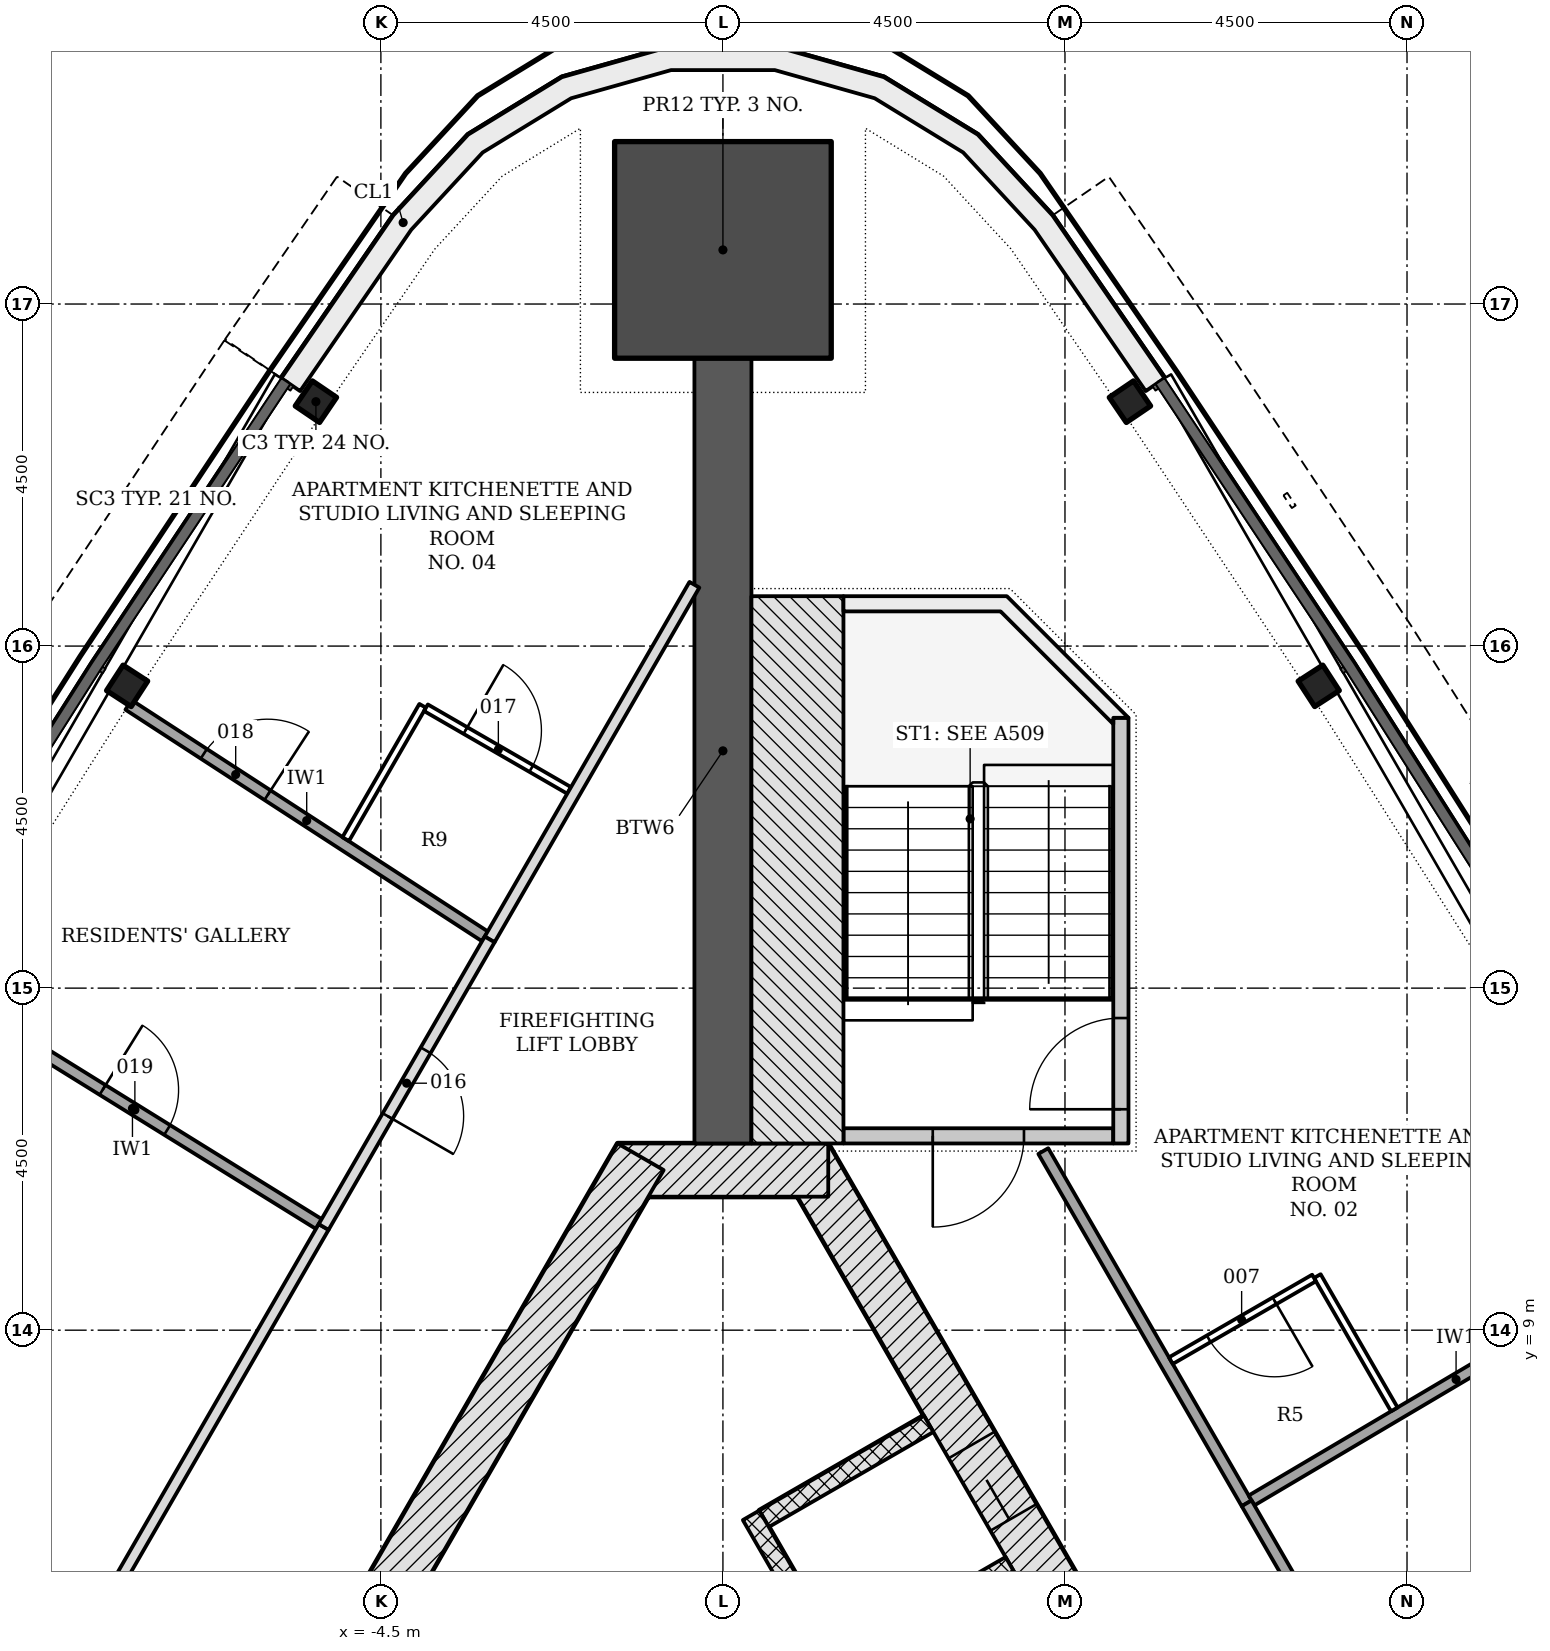
"""IFC4 building model, lengths in metres.
Left out: names, types, materials, properties, quantities, classifications, styles, units other than length and angle.
Written with IfcOpenShell. Run it as: python <this file> out.ifc"""

import sys

from ifc_helpers import new_model, si_unit, direction, frame, frame_2d, origin, origin_2d, place, context, subcontext, project, spatial, polyline, rectangle, i_section, outline, extrude, element, fill, save


model = new_model("IFC4")
c1 = context("Model", 3, precision=1e-05, world=origin(), true_north=direction((0.0, 1.0)))
c2 = subcontext(c1, "Body", "Model", "MODEL_VIEW")
j1 = project(units=[si_unit("LENGTHUNIT", "METRE"), si_unit("PLANEANGLEUNIT", "RADIAN")], contexts=[c1])
p1 = place(None, origin())
s1 = spatial("IfcSite", under=j1, at=p1, CompositionType="ELEMENT")
p2 = place(p1, origin())
s2 = spatial("IfcBuilding", under=s1, at=p2, CompositionType="ELEMENT")
p3 = place(p2, frame((0.0, 0.0, 158.1)))
s3 = spatial("IfcBuildingStorey", under=s2, at=p3, CompositionType="ELEMENT", Elevation=158.1)
p4 = place(p3, frame((10.311, -4.703, -0.2), z_axis=(0.0, 0.0, 1.0), x_axis=(-0.500001446645, 0.866024568562, 0.0)))
e1 = element("IfcWall", 1, at=p4, inside=s3, PredefinedType="SHEAR", context=c2, shape_type="SweptSolid", body=[
    extrude(rectangle(XDim=18.458, YDim=0.7, at=frame_2d((9.229, 0.0))), origin(), (0.0, 0.0, 1.0), 3.6),
])
p5 = place(p4, frame((4.379, 0.0, 0.2)))
e2 = element("IfcOpeningElement", 2, at=p5, cuts=e1, PredefinedType="OPENING", context=c2, shape_type="SweptSolid", body=[
    extrude(rectangle(XDim=1.1, YDim=2.1, at=frame_2d((0.55, 1.05))), frame((0.0, 0.36, 0.0), z_axis=(0.0, -1.0, 0.0), x_axis=(1.0, 0.0, 0.0)), (0.0, 0.0, 1.0), 0.72),
])
p6 = place(p4, frame((6.529, 0.0, 0.2)))
e3 = element("IfcOpeningElement", 3, at=p6, cuts=e1, PredefinedType="OPENING", context=c2, shape_type="SweptSolid", body=[
    extrude(rectangle(XDim=1.1, YDim=2.1, at=frame_2d((0.55, 1.05))), frame((0.0, 0.36, 0.0), z_axis=(0.0, -1.0, 0.0), x_axis=(1.0, 0.0, 0.0)), (0.0, 0.0, 1.0), 0.72),
])
p7 = place(p4, frame((8.679, 0.0, 0.2)))
e4 = element("IfcOpeningElement", 4, at=p7, cuts=e1, PredefinedType="OPENING", context=c2, shape_type="SweptSolid", body=[
    extrude(rectangle(XDim=1.1, YDim=2.1, at=frame_2d((0.55, 1.05))), frame((0.0, 0.36, 0.0), z_axis=(0.0, -1.0, 0.0), x_axis=(1.0, 0.0, 0.0)), (0.0, 0.0, 1.0), 0.72),
])
p8 = place(p4, frame((10.829, 0.0, 0.2)))
e5 = element("IfcOpeningElement", 5, at=p8, cuts=e1, PredefinedType="OPENING", context=c2, shape_type="SweptSolid", body=[
    extrude(rectangle(XDim=1.1, YDim=2.1, at=frame_2d((0.55, 1.05))), frame((0.0, 0.36, 0.0), z_axis=(0.0, -1.0, 0.0), x_axis=(1.0, 0.0, 0.0)), (0.0, 0.0, 1.0), 0.72),
])
p9 = place(p4, frame((12.979, 0.0, 0.2)))
e6 = element("IfcOpeningElement", 6, at=p9, cuts=e1, PredefinedType="OPENING", context=c2, shape_type="SweptSolid", body=[
    extrude(rectangle(XDim=1.1, YDim=2.1, at=frame_2d((0.55, 1.05))), frame((0.0, 0.36, 0.0), z_axis=(0.0, -1.0, 0.0), x_axis=(1.0, 0.0, 0.0)), (0.0, 0.0, 1.0), 0.72),
])
p10 = place(p3, frame((1.386, 11.106, -0.2), z_axis=(0.0, 0.0, 1.0), x_axis=(-1.0, 0.0, 0.0)))
e7 = element("IfcWall", 7, at=p10, inside=s3, PredefinedType="SHEAR", context=c2, shape_type="SweptSolid", body=[
    extrude(rectangle(XDim=2.771, YDim=0.7, at=frame_2d((1.386, 0.0))), origin(), (0.0, 0.0, 1.0), 3.6),
])
p11 = place(p3, frame((-1.083, 11.281, -0.2), z_axis=(0.0, 0.0, 1.0), x_axis=(-0.500001446645, -0.866024568562, 0.0)))
e8 = element("IfcWall", 8, at=p11, inside=s3, PredefinedType="SHEAR", context=c2, shape_type="SweptSolid", body=[
    extrude(rectangle(XDim=18.458, YDim=0.7, at=frame_2d((9.229, 0.0))), origin(), (0.0, 0.0, 1.0), 3.6),
])
p12 = place(p11, frame((8.979, 0.0, 0.2)))
e9 = element("IfcOpeningElement", 9, at=p12, cuts=e8, PredefinedType="OPENING", context=c2, shape_type="SweptSolid", body=[
    extrude(rectangle(XDim=1.2, YDim=2.1, at=frame_2d((0.6, 1.05))), frame((0.0, 0.36, 0.0), z_axis=(0.0, -1.0, 0.0), x_axis=(1.0, 0.0, 0.0)), (0.0, 0.0, 1.0), 0.72),
])
p13 = place(p11, frame((11.029, 0.0, 0.2)))
e10 = element("IfcOpeningElement", 10, at=p13, cuts=e8, PredefinedType="OPENING", context=c2, shape_type="SweptSolid", body=[
    extrude(rectangle(XDim=1.2, YDim=2.1, at=frame_2d((0.6, 1.05))), frame((0.0, 0.36, 0.0), z_axis=(0.0, -1.0, 0.0), x_axis=(1.0, 0.0, 0.0)), (0.0, 0.0, 1.0), 0.72),
])
p14 = place(p3, frame((0.0, 11.456, -0.2), z_axis=(0.0, 0.0, 1.0), x_axis=(0.0, 1.0, 0.0)))
e11 = element("IfcWall", 11, at=p14, inside=s3, PredefinedType="SHEAR", context=c2, shape_type="SweptSolid", body=[
    extrude(rectangle(XDim=10.331, YDim=0.75, at=frame_2d((5.166, 0.0))), origin(), (0.0, 0.0, 1.0), 3.6),
])
p15 = place(p3, frame((0.0, 23.212, -0.2), z_axis=(0.0, 0.0, 1.0), x_axis=(0.0, 1.0, 0.0)))
e12 = element("IfcColumn", 12, at=p15, inside=s3, PredefinedType="COLUMN", context=c2, shape_type="SweptSolid", body=[
    extrude(rectangle(XDim=2.85, YDim=2.85, at=origin_2d()), origin(), (0.0, 0.0, 1.0), 3.6),
])
for number, where, z_axis, x_axis in (
    (13, (-5.355, 21.215, -0.2), (0.0, 0.0, 1.0), (-0.562, -0.827, 0.0)),
    (14, (-7.839, 17.477, -0.2), (0.0, 0.0, 1.0), (-0.545, -0.839, 0.0)),
    (15, (7.839, 17.477, -0.2), (0.0, 0.0, 1.0), (-0.545, 0.839, 0.0)),
    (16, (5.355, 21.215, -0.2), (0.0, 0.0, 1.0), (-0.562, 0.827, 0.0)),
):
    element("IfcColumn", number, at=place(p3, frame(where, z_axis=z_axis, x_axis=x_axis)), inside=s3, PredefinedType="COLUMN", context=c2, shape_type="SweptSolid", body=[
        extrude(i_section(OverallWidth=0.399, OverallDepth=0.386, WebThickness=0.021, FlangeThickness=0.033, FilletRadius=0.015, at=origin_2d()), origin(), (0.0, 0.0, 1.0), 3.6),
    ])
p16 = place(p3, origin())
e17 = element("IfcWall", 17, at=p16, inside=s3, PredefinedType="NOTDEFINED", context=c2, shape_type="SweptSolid", body=[
    extrude(outline(polyline([(5.81, 21.524), (4.336, 23.665), (3.353, 24.728), (2.118, 25.485), (0.724, 25.877), (-0.724, 25.877), (-2.118, 25.485), (-3.353, 24.728), (-4.336, 23.665), (-5.81, 21.524), (-5.562, 21.354), (-4.101, 23.477), (-3.16, 24.494), (-1.996, 25.207), (-0.683, 25.578), (0.683, 25.578), (1.996, 25.207), (3.16, 24.494), (4.101, 23.477), (5.562, 21.354), (5.81, 21.524)])), origin(), (0.0, 0.0, 1.0), 3.3),
])
for number, where, z_axis, x_axis in (
    (18, (3.781, 5.907, -0.2), (0.0, 0.0, 1.0), (-0.866, -0.5, 0.0)),
    (19, (2.706, 7.769, -0.2), (0.0, 0.0, 1.0), (-0.866, -0.5, 0.0)),
):
    element("IfcWall", number, at=place(p3, frame(where, z_axis=z_axis, x_axis=x_axis)), inside=s3, PredefinedType="PARTITIONING", context=c2, shape_type="SweptSolid", body=[
        extrude(rectangle(XDim=2.5, YDim=0.25, at=frame_2d((1.25, 0.0))), origin(), (0.0, 0.0, 1.0), 3.6),
    ])
p17 = place(p3, frame((5.87, -2.961, 0.0), z_axis=(0.0, 0.0, 1.0), x_axis=(-0.50000615651, 0.866021849293, 0.0)))
e20 = element("IfcWall", 20, at=p17, inside=s3, PredefinedType="PARTITIONING", context=c2, shape_type="SweptSolid", body=[
    extrude(rectangle(XDim=11.0, YDim=0.25, at=frame_2d((5.5, 0.0))), origin(), (0.0, 0.0, 1.0), 3.4),
])
p18 = place(p3, frame((5.135, 11.556, -0.2), z_axis=(0.0, 0.0, 1.0), x_axis=(-1.0, 0.0, 0.0)))
e21 = element("IfcWall", 21, at=p18, inside=s3, PredefinedType="SHEAR", context=c2, shape_type="SweptSolid", body=[
    extrude(rectangle(XDim=3.55, YDim=0.2, at=frame_2d((1.775, 0.0))), origin(), (0.0, 0.0, 1.0), 3.6),
])
p19 = place(p18, frame((1.175, 0.0, 0.2)))
e22 = element("IfcOpeningElement", 22, at=p19, cuts=e21, PredefinedType="OPENING", context=c2, shape_type="SweptSolid", body=[
    extrude(rectangle(XDim=1.2, YDim=2.1, at=frame_2d((0.6, 1.05))), frame((0.0, 0.11, 0.0), z_axis=(0.0, -1.0, 0.0), x_axis=(1.0, 0.0, 0.0)), (0.0, 0.0, 1.0), 0.22),
])
p20 = place(p3, frame((5.236, 11.456, -0.2), z_axis=(0.0, 0.0, 1.0), x_axis=(0.0, 1.0, 0.0)))
e23 = element("IfcWall", 23, at=p20, inside=s3, PredefinedType="SHEAR", context=c2, shape_type="SweptSolid", body=[
    extrude(rectangle(XDim=5.6, YDim=0.2, at=frame_2d((2.8, 0.0))), origin(), (0.0, 0.0, 1.0), 3.6),
])
p21 = place(p20, frame((0.45, 0.0, 0.2)))
e24 = element("IfcOpeningElement", 24, at=p21, cuts=e23, PredefinedType="OPENING", context=c2, shape_type="SweptSolid", body=[
    extrude(rectangle(XDim=1.2, YDim=2.1, at=frame_2d((0.6, 1.05))), frame((0.0, 0.11, 0.0), z_axis=(0.0, -1.0, 0.0), x_axis=(1.0, 0.0, 0.0)), (0.0, 0.0, 1.0), 0.22),
])
p22 = place(p3, frame((0.98, 11.456, -0.2), z_axis=(0.0, 0.0, 1.0), x_axis=(0.0, 1.0, 0.0)))
e25 = element("IfcWall", 25, at=p22, inside=s3, PredefinedType="SHEAR", context=c2, shape_type="SweptSolid", body=[
    extrude(rectangle(XDim=7.2, YDim=1.211, at=frame_2d((3.6, 0.0))), origin(), (0.0, 0.0, 1.0), 3.6),
])
p23 = place(p3, frame((0.0, 0.0, -0.2)))
e26 = element("IfcWall", 26, at=p23, inside=s3, PredefinedType="SHEAR", context=c2, shape_type="SweptSolid", body=[
    extrude(outline(polyline([(5.336, 17.056), (3.736, 18.656), (1.586, 18.656), (1.586, 18.456), (3.653, 18.456), (5.135, 16.974), (5.135, 17.056), (5.135, 17.056), (5.135, 17.056), (5.135, 17.056), (5.135, 17.056), (5.135, 17.056), (5.135, 17.056), (5.135, 17.056), (5.135, 17.056), (5.135, 17.056), (5.135, 17.056), (5.135, 17.056), (5.135, 17.056), (5.135, 17.056), (5.135, 17.056), (5.135, 17.056), (5.135, 17.056), (5.336, 17.056)])), origin(), (0.0, 0.0, 1.0), 3.6),
])
p24 = place(p3, frame((6.89, 6.722, 0.0), z_axis=(0.0, 0.0, 1.0), x_axis=(-0.500025224267, 0.866010840057, 0.0)))
e27 = element("IfcWall", 27, at=p24, inside=s3, PredefinedType="PARTITIONING", context=c2, shape_type="SweptSolid", body=[
    extrude(rectangle(XDim=5.351, YDim=0.15, at=frame_2d((2.676, 0.0))), origin(), (0.0, 0.0, 1.0), 2.847),
])
p25 = place(p3, frame((14.582, 6.06, 0.0), z_axis=(0.0, 0.0, 1.0), x_axis=(-0.871229292109, -0.490876278272, 0.0)))
e28 = element("IfcWall", 28, at=p25, inside=s3, PredefinedType="PARTITIONING", context=c2, shape_type="SweptSolid", body=[
    extrude(rectangle(XDim=6.256, YDim=0.15, at=frame_2d((3.128, 0.0))), origin(), (0.0, 0.0, 1.0), 3.4),
])
p26 = place(p3, frame((12.336, 9.943, 0.0), z_axis=(0.0, 0.0, 1.0), x_axis=(-0.860742216303, -0.509041095663, 0.0)))
e29 = element("IfcWall", 29, at=p26, inside=s3, PredefinedType="PARTITIONING", context=c2, shape_type="SweptSolid", body=[
    extrude(rectangle(XDim=6.252, YDim=0.15, at=frame_2d((3.126, 0.0))), origin(), (0.0, 0.0, 1.0), 3.4),
])
p27 = place(p26, frame((1.513, 0.0, 0.0)))
e30 = element("IfcOpeningElement", 30, at=p27, cuts=e29, PredefinedType="OPENING", context=c2, shape_type="SweptSolid", body=[
    extrude(rectangle(XDim=1.0, YDim=2.1, at=frame_2d((0.5, 1.05))), frame((0.0, 0.085, 0.0), z_axis=(0.0, -1.0, 0.0), x_axis=(1.0, 0.0, 0.0)), (0.0, 0.0, 1.0), 0.17),
])
p28 = place(p3, frame((9.067, 2.953, 0.0), z_axis=(0.0, 0.0, 1.0), x_axis=(-0.499987877897, 0.866032402371, 0.0)))
e31 = element("IfcWall", 31, at=p28, inside=s3, PredefinedType="PARTITIONING", context=c2, shape_type="SweptSolid", body=[
    extrude(rectangle(XDim=4.353, YDim=0.15, at=frame_2d((2.176, 0.0))), origin(), (0.0, 0.0, 1.0), 2.847),
])
p29 = place(p28, frame((1.426, 0.0, 0.0)))
e32 = element("IfcOpeningElement", 32, at=p29, cuts=e31, PredefinedType="OPENING", context=c2, shape_type="SweptSolid", body=[
    extrude(rectangle(XDim=1.5, YDim=2.1, at=frame_2d((0.75, 1.05))), frame((0.0, 0.085, 0.0), z_axis=(0.0, -1.0, 0.0), x_axis=(1.0, 0.0, 0.0)), (0.0, 0.0, 1.0), 0.17),
])
p30 = place(p3, frame((8.833, 7.958, 0.0), z_axis=(0.0, 0.0, 1.0), x_axis=(-0.499938124251, 0.866061124818, 0.0)))
e33 = element("IfcWall", 33, at=p30, inside=s3, PredefinedType="PARTITIONING", context=c2, shape_type="SweptSolid", body=[
    extrude(rectangle(XDim=2.025, YDim=0.1, at=frame_2d((1.013, 0.0))), origin(), (0.0, 0.0, 1.0), 3.4),
])
p31 = place(p3, frame((7.777, 9.687, 0.0), z_axis=(0.0, 0.0, 1.0), x_axis=(-0.866037911478, -0.499978335414, 0.0)))
e34 = element("IfcWall", 34, at=p31, inside=s3, PredefinedType="PARTITIONING", context=c2, shape_type="SweptSolid", body=[
    extrude(rectangle(XDim=2.175, YDim=0.1, at=frame_2d((1.087, 0.0))), origin(), (0.0, 0.0, 1.0), 3.4),
])
p32 = place(p31, frame((0.6, 0.0, 0.0)))
e35 = element("IfcOpeningElement", 35, at=p32, cuts=e34, PredefinedType="OPENING", context=c2, shape_type="SweptSolid", body=[
    extrude(rectangle(XDim=1.0, YDim=2.1, at=frame_2d((0.5, 1.05))), frame((0.0, 0.06, 0.0), z_axis=(0.0, -1.0, 0.0), x_axis=(1.0, 0.0, 0.0)), (0.0, 0.0, 1.0), 0.12),
])
p33 = place(p3, frame((-0.375, 18.807, 0.0), z_axis=(0.0, 0.0, 1.0), x_axis=(-0.499989180974, -0.866031650062, 0.0)))
e36 = element("IfcWall", 36, at=p33, inside=s3, PredefinedType="PARTITIONING", context=c2, shape_type="SweptSolid", body=[
    extrude(rectangle(XDim=5.388, YDim=0.15, at=frame_2d((2.694, 0.0))), origin(), (0.0, 0.0, 1.0), 2.847),
])
p34 = place(p3, frame((-5.253, 10.358, 0.0), z_axis=(0.0, 0.0, 1.0), x_axis=(-0.49999425657, -0.86602871973, 0.0)))
e37 = element("IfcWall", 37, at=p34, inside=s3, PredefinedType="PARTITIONING", context=c2, shape_type="SweptSolid", body=[
    extrude(rectangle(XDim=13.84, YDim=0.15, at=frame_2d((6.92, 0.0))), origin(), (0.0, 0.0, 1.0), 2.847),
])
p35 = place(p3, frame((-7.82, 17.226, 0.0), z_axis=(0.0, 0.0, 1.0), x_axis=(0.838649113596, -0.544672070391, 0.0)))
e38 = element("IfcWall", 38, at=p35, inside=s3, PredefinedType="PARTITIONING", context=c2, shape_type="SweptSolid", body=[
    extrude(rectangle(XDim=5.59, YDim=0.15, at=frame_2d((2.795, 0.0))), origin(), (0.0, 0.0, 1.0), 3.4),
])
p36 = place(p35, frame((1.181, 0.0, 0.0)))
e39 = element("IfcOpeningElement", 39, at=p36, cuts=e38, PredefinedType="OPENING", context=c2, shape_type="SweptSolid", body=[
    extrude(rectangle(XDim=1.0, YDim=2.1, at=frame_2d((0.5, 1.05))), frame((0.0, 0.085, 0.0), z_axis=(0.0, -1.0, 0.0), x_axis=(1.0, 0.0, 0.0)), (0.0, 0.0, 1.0), 0.17),
])
p37 = place(p3, frame((-10.22, 13.437, 0.0), z_axis=(0.0, 0.0, 1.0), x_axis=(0.849899659129, -0.526944560094, 0.0)))
e40 = element("IfcWall", 40, at=p37, inside=s3, PredefinedType="PARTITIONING", context=c2, shape_type="SweptSolid", body=[
    extrude(rectangle(XDim=5.769, YDim=0.15, at=frame_2d((2.884, 0.0))), origin(), (0.0, 0.0, 1.0), 3.4),
])
p38 = place(p37, frame((2.422, 0.0, 0.0)))
e41 = element("IfcOpeningElement", 41, at=p38, cuts=e40, PredefinedType="OPENING", context=c2, shape_type="SweptSolid", body=[
    extrude(rectangle(XDim=1.0, YDim=2.1, at=frame_2d((0.5, 1.05))), frame((0.0, 0.085, 0.0), z_axis=(0.0, -1.0, 0.0), x_axis=(1.0, 0.0, 0.0)), (0.0, 0.0, 1.0), 0.17),
])
p39 = place(p3, frame((-3.069, 14.141, 0.0), z_axis=(0.0, 0.0, 1.0), x_axis=(-0.500015937133, -0.866016202281, 0.0)))
e42 = element("IfcWall", 42, at=p39, inside=s3, PredefinedType="PARTITIONING", context=c2, shape_type="SweptSolid", body=[
    extrude(rectangle(XDim=4.368, YDim=0.15, at=frame_2d((2.184, 0.0))), origin(), (0.0, 0.0, 1.0), 2.847),
])
p40 = place(p39, frame((1.684, 0.0, 0.0)))
e43 = element("IfcOpeningElement", 43, at=p40, cuts=e42, PredefinedType="OPENING", context=c2, shape_type="SweptSolid", body=[
    extrude(rectangle(XDim=1.0, YDim=2.1, at=frame_2d((0.5, 1.05))), frame((0.0, 0.085, 0.0), z_axis=(0.0, -1.0, 0.0), x_axis=(1.0, 0.0, 0.0)), (0.0, 0.0, 1.0), 0.17),
])
p41 = place(p3, frame((-4.963, 15.46, 0.0), z_axis=(0.0, 0.0, 1.0), x_axis=(0.499990325971, 0.866030989016, 0.0)))
e44 = element("IfcWall", 44, at=p41, inside=s3, PredefinedType="PARTITIONING", context=c2, shape_type="SweptSolid", body=[
    extrude(rectangle(XDim=2.025, YDim=0.1, at=frame_2d((1.012, 0.0))), origin(), (0.0, 0.0, 1.0), 2.847),
])
p42 = place(p3, frame((-3.907, 17.189, 0.0), z_axis=(0.0, 0.0, 1.0), x_axis=(0.865989304205, -0.500062521093, 0.0)))
e45 = element("IfcWall", 45, at=p42, inside=s3, PredefinedType="PARTITIONING", context=c2, shape_type="SweptSolid", body=[
    extrude(rectangle(XDim=2.175, YDim=0.1, at=frame_2d((1.087, 0.0))), origin(), (0.0, 0.0, 1.0), 3.4),
])
p43 = place(p42, frame((0.6, 0.0, 0.0)))
e46 = element("IfcOpeningElement", 46, at=p43, cuts=e45, PredefinedType="OPENING", context=c2, shape_type="SweptSolid", body=[
    extrude(rectangle(XDim=1.0, YDim=2.1, at=frame_2d((0.5, 1.05))), frame((0.0, 0.06, 0.0), z_axis=(0.0, -1.0, 0.0), x_axis=(1.0, 0.0, 0.0)), (0.0, 0.0, 1.0), 0.12),
])
p44 = place(p9, origin())
e47 = element("IfcDoor", 47, at=p44, inside=s3, OperationType="DOUBLE_DOOR_SLIDING", PredefinedType="DOOR", context=c2, shape_type="SweptSolid", body=[
    extrude(rectangle(XDim=1.1, YDim=2.1, at=frame_2d((0.55, 1.05))), frame((0.0, 0.025, 0.0), z_axis=(0.0, -1.0, 0.0), x_axis=(1.0, 0.0, 0.0)), (0.0, 0.0, 1.0), 0.05),
])
fill(e6, e47)
p45 = place(p19, origin())
e48 = element("IfcDoor", 48, at=p45, inside=s3, OperationType="SINGLE_SWING_RIGHT", PredefinedType="DOOR", context=c2, shape_type="SweptSolid", body=[
    extrude(rectangle(XDim=1.2, YDim=2.1, at=frame_2d((0.6, 1.05))), frame((0.0, 0.025, 0.0), z_axis=(0.0, -1.0, 0.0), x_axis=(1.0, 0.0, 0.0)), (0.0, 0.0, 1.0), 0.05),
])
fill(e22, e48)
p46 = place(p21, origin())
e49 = element("IfcDoor", 49, at=p46, inside=s3, OperationType="SINGLE_SWING_LEFT", PredefinedType="DOOR", context=c2, shape_type="SweptSolid", body=[
    extrude(rectangle(XDim=1.2, YDim=2.1, at=frame_2d((0.6, 1.05))), frame((0.0, 0.025, 0.0), z_axis=(0.0, -1.0, 0.0), x_axis=(1.0, 0.0, 0.0)), (0.0, 0.0, 1.0), 0.05),
])
fill(e24, e49)
p47 = place(p32, origin())
e50 = element("IfcDoor", 50, at=p47, inside=s3, OperationType="SINGLE_SWING_LEFT", PredefinedType="DOOR", context=c2, shape_type="SweptSolid", body=[
    extrude(rectangle(XDim=1.0, YDim=2.1, at=frame_2d((0.5, 1.05))), frame((0.0, 0.025, 0.0), z_axis=(0.0, -1.0, 0.0), x_axis=(1.0, 0.0, 0.0)), (0.0, 0.0, 1.0), 0.05),
])
fill(e35, e50)
p48 = place(p40, origin())
e51 = element("IfcDoor", 51, at=p48, inside=s3, OperationType="SINGLE_SWING_RIGHT", PredefinedType="DOOR", context=c2, shape_type="SweptSolid", body=[
    extrude(rectangle(XDim=1.0, YDim=2.1, at=frame_2d((0.5, 1.05))), frame((0.0, 0.025, 0.0), z_axis=(0.0, -1.0, 0.0), x_axis=(1.0, 0.0, 0.0)), (0.0, 0.0, 1.0), 0.05),
])
fill(e43, e51)
p49 = place(p43, origin())
e52 = element("IfcDoor", 52, at=p49, inside=s3, OperationType="SINGLE_SWING_LEFT", PredefinedType="DOOR", context=c2, shape_type="SweptSolid", body=[
    extrude(rectangle(XDim=1.0, YDim=2.1, at=frame_2d((0.5, 1.05))), frame((0.0, 0.025, 0.0), z_axis=(0.0, -1.0, 0.0), x_axis=(1.0, 0.0, 0.0)), (0.0, 0.0, 1.0), 0.05),
])
fill(e46, e52)
p50 = place(p36, origin())
e53 = element("IfcDoor", 53, at=p50, inside=s3, OperationType="SINGLE_SWING_RIGHT", PredefinedType="DOOR", context=c2, shape_type="SweptSolid", body=[
    extrude(rectangle(XDim=1.0, YDim=2.1, at=frame_2d((0.5, 1.05))), frame((0.0, 0.025, 0.0), z_axis=(0.0, -1.0, 0.0), x_axis=(1.0, 0.0, 0.0)), (0.0, 0.0, 1.0), 0.05),
])
fill(e39, e53)
p51 = place(p38, origin())
e54 = element("IfcDoor", 54, at=p51, inside=s3, OperationType="SINGLE_SWING_LEFT", PredefinedType="DOOR", context=c2, shape_type="SweptSolid", body=[
    extrude(rectangle(XDim=1.0, YDim=2.1, at=frame_2d((0.5, 1.05))), frame((0.0, 0.025, 0.0), z_axis=(0.0, -1.0, 0.0), x_axis=(1.0, 0.0, 0.0)), (0.0, 0.0, 1.0), 0.05),
])
fill(e41, e54)
save(model, sys.argv[1])
